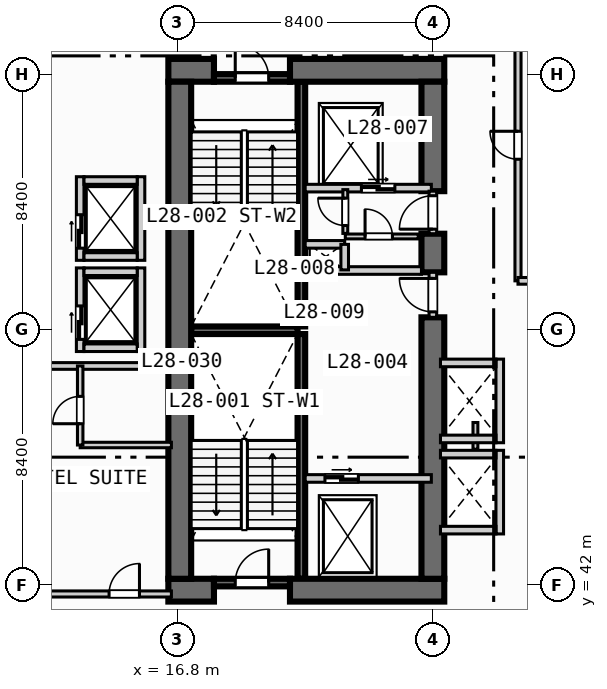
"""IFC4 building model, lengths in metres.
Left out: names, types, materials, properties, quantities, classifications, styles, units other than length and angle.
Written with IfcOpenShell. Run it as: python <this file> out.ifc"""

import sys

from ifc_helpers import new_model, si_unit, direction, frame, frame_2d, origin, place, context, subcontext, project, spatial, rectangle, extrude, element, fill, save


model = new_model("IFC4")
c1 = context("Model", 3, precision=1e-05, world=origin(), true_north=direction((0.0, 1.0)))
c2 = subcontext(c1, "Body", "Model", "MODEL_VIEW")
j1 = project(units=[si_unit("LENGTHUNIT", "METRE"), si_unit("PLANEANGLEUNIT", "RADIAN")], contexts=[c1])
p1 = place(None, origin())
s1 = spatial("IfcSite", under=j1, at=p1, CompositionType="ELEMENT")
p2 = place(p1, origin())
s2 = spatial("IfcBuilding", under=s1, at=p2, CompositionType="ELEMENT")
p3 = place(p2, frame((0.0, 0.0, 119.0)))
s3 = spatial("IfcBuildingStorey", under=s2, at=p3, CompositionType="ELEMENT", Elevation=119.0)
for number, where, z_axis, x_axis in (
    (1, (20.875, 42.2, 0.0), (0.0, 0.0, 1.0), (0.0, 1.0, 0.0)),
    (2, (20.875, 50.5, 0.0), (0.0, 0.0, 1.0), (0.0, 1.0, 0.0)),
):
    element("IfcWall", number, at=place(p3, frame(where, z_axis=z_axis, x_axis=x_axis)), inside=s3, PredefinedType="SOLIDWALL", context=c2, shape_type="SweptSolid", body=[
        extrude(rectangle(XDim=8.05, YDim=0.25, at=frame_2d((4.025, 0.0))), origin(), (0.0, 0.0, 1.0), 3.55),
    ])
p4 = place(p3, frame((17.25, 50.375, 0.0), z_axis=(0.0, 0.0, 1.0), x_axis=(1.0, 0.0, 0.0)))
e3 = element("IfcWall", 3, at=p4, inside=s3, PredefinedType="SOLIDWALL", context=c2, shape_type="SweptSolid", body=[
    extrude(rectangle(XDim=3.5, YDim=0.25, at=frame_2d((1.75, 0.0))), origin(), (0.0, 0.0, 1.0), 3.55),
])
p5 = place(p3, frame((16.5, 41.825, 0.0), z_axis=(0.0, 0.0, 1.0), x_axis=(1.0, 0.0, 0.0)))
e4 = element("IfcWall", 4, at=p5, inside=s3, PredefinedType="SHEAR", context=c2, shape_type="SweptSolid", body=[
    extrude(rectangle(XDim=1.5, YDim=0.75, at=frame_2d((0.75, 0.0))), origin(), (0.0, 0.0, 1.0), 3.55),
])
p6 = place(p3, frame((20.5, 41.825, 0.0), z_axis=(0.0, 0.0, 1.0), x_axis=(1.0, 0.0, 0.0)))
e5 = element("IfcWall", 5, at=p6, inside=s3, PredefinedType="SHEAR", context=c2, shape_type="SweptSolid", body=[
    extrude(rectangle(XDim=5.075, YDim=0.75, at=frame_2d((2.538, 0.0))), origin(), (0.0, 0.0, 1.0), 3.55),
])
p7 = place(p3, frame((16.5, 58.925, 0.0), z_axis=(0.0, 0.0, 1.0), x_axis=(1.0, 0.0, 0.0)))
e6 = element("IfcWall", 6, at=p7, inside=s3, PredefinedType="SHEAR", context=c2, shape_type="SweptSolid", body=[
    extrude(rectangle(XDim=1.5, YDim=0.75, at=frame_2d((0.75, 0.0))), origin(), (0.0, 0.0, 1.0), 3.55),
])
p8 = place(p3, frame((20.5, 58.925, 0.0), z_axis=(0.0, 0.0, 1.0), x_axis=(1.0, 0.0, 0.0)))
e7 = element("IfcWall", 7, at=p8, inside=s3, PredefinedType="SHEAR", context=c2, shape_type="SweptSolid", body=[
    extrude(rectangle(XDim=5.075, YDim=0.75, at=frame_2d((2.538, 0.0))), origin(), (0.0, 0.0, 1.0), 3.55),
])
p9 = place(p3, frame((16.875, 42.2, 0.0), z_axis=(0.0, 0.0, 1.0), x_axis=(0.0, 1.0, 0.0)))
e8 = element("IfcWall", 8, at=p9, inside=s3, PredefinedType="SHEAR", context=c2, shape_type="SweptSolid", body=[
    extrude(rectangle(XDim=16.35, YDim=0.75, at=frame_2d((8.175, 0.0))), origin(), (0.0, 0.0, 1.0), 3.55),
])
p10 = place(p3, frame((25.2, 42.2, 0.0), z_axis=(0.0, 0.0, 1.0), x_axis=(0.0, 1.0, 0.0)))
e9 = element("IfcWall", 9, at=p10, inside=s3, PredefinedType="SHEAR", context=c2, shape_type="SweptSolid", body=[
    extrude(rectangle(XDim=8.6, YDim=0.75, at=frame_2d((4.3, 0.0))), origin(), (0.0, 0.0, 1.0), 3.55),
])
p11 = place(p3, frame((25.2, 52.28, 0.0), z_axis=(0.0, 0.0, 1.0), x_axis=(0.0, 1.0, 0.0)))
e10 = element("IfcWall", 10, at=p11, inside=s3, PredefinedType="SHEAR", context=c2, shape_type="SweptSolid", body=[
    extrude(rectangle(XDim=1.27, YDim=0.75, at=frame_2d((0.635, 0.0))), origin(), (0.0, 0.0, 1.0), 3.55),
])
p12 = place(p3, frame((25.2, 54.95, 0.0), z_axis=(0.0, 0.0, 1.0), x_axis=(0.0, 1.0, 0.0)))
e11 = element("IfcWall", 11, at=p12, inside=s3, PredefinedType="SHEAR", context=c2, shape_type="SweptSolid", body=[
    extrude(rectangle(XDim=3.6, YDim=0.75, at=frame_2d((1.8, 0.0))), origin(), (0.0, 0.0, 1.0), 3.55),
])
p13 = place(p3, frame((18.0, 42.075, 0.0), z_axis=(0.0, 0.0, 1.0), x_axis=(1.0, 0.0, 0.0)))
e12 = element("IfcWall", 12, at=p13, inside=s3, PredefinedType="SOLIDWALL", context=c2, shape_type="SweptSolid", body=[
    extrude(rectangle(XDim=2.5, YDim=0.25, at=frame_2d((1.25, 0.0))), origin(), (0.0, 0.0, 1.0), 3.55),
])
p14 = place(p13, frame((0.7, 0.0, 0.0)))
e13 = element("IfcOpeningElement", 13, at=p14, cuts=e12, PredefinedType="OPENING", context=c2, shape_type="SweptSolid", body=[
    extrude(rectangle(XDim=1.1, YDim=2.15, at=frame_2d((0.55, 1.075))), frame((0.0, 0.135, 0.0), z_axis=(0.0, -1.0, 0.0), x_axis=(1.0, 0.0, 0.0)), (0.0, 0.0, 1.0), 0.27),
])
p15 = place(p3, frame((18.0, 58.675, 0.0), z_axis=(0.0, 0.0, 1.0), x_axis=(1.0, 0.0, 0.0)))
e14 = element("IfcWall", 14, at=p15, inside=s3, PredefinedType="SOLIDWALL", context=c2, shape_type="SweptSolid", body=[
    extrude(rectangle(XDim=2.5, YDim=0.25, at=frame_2d((1.25, 0.0))), origin(), (0.0, 0.0, 1.0), 3.55),
])
p16 = place(p15, frame((0.7, 0.0, 0.0)))
e15 = element("IfcOpeningElement", 15, at=p16, cuts=e14, PredefinedType="OPENING", context=c2, shape_type="SweptSolid", body=[
    extrude(rectangle(XDim=1.1, YDim=2.15, at=frame_2d((0.55, 1.075))), frame((0.0, 0.135, 0.0), z_axis=(0.0, -1.0, 0.0), x_axis=(1.0, 0.0, 0.0)), (0.0, 0.0, 1.0), 0.27),
])
p17 = place(p3, frame((21.0, 45.5, 0.0), z_axis=(0.0, 0.0, 1.0), x_axis=(1.0, 0.0, 0.0)))
e16 = element("IfcWall", 16, at=p17, inside=s3, PredefinedType="SOLIDWALL", context=c2, shape_type="SweptSolid", body=[
    extrude(rectangle(XDim=4.15, YDim=0.25, at=frame_2d((2.075, 0.0))), origin(), (0.0, 0.0, 1.0), 3.55),
])
p18 = place(p17, frame((0.65, 0.0, 0.0)))
e17 = element("IfcOpeningElement", 17, at=p18, cuts=e16, PredefinedType="OPENING", context=c2, shape_type="SweptSolid", body=[
    extrude(rectangle(XDim=1.1, YDim=2.15, at=frame_2d((0.55, 1.075))), frame((0.0, 0.135, 0.0), z_axis=(0.0, -1.0, 0.0), x_axis=(1.0, 0.0, 0.0)), (0.0, 0.0, 1.0), 0.27),
])
p19 = place(p3, frame((25.2, 50.8, 0.0), z_axis=(0.0, 0.0, 1.0), x_axis=(0.0, 1.0, 0.0)))
e18 = element("IfcWall", 18, at=p19, inside=s3, PredefinedType="SOLIDWALL", context=c2, shape_type="SweptSolid", body=[
    extrude(rectangle(XDim=1.48, YDim=0.25, at=frame_2d((0.74, 0.0))), origin(), (0.0, 0.0, 1.0), 3.55),
])
p20 = place(p19, frame((0.18, 0.0, 0.0)))
e19 = element("IfcOpeningElement", 19, at=p20, cuts=e18, PredefinedType="OPENING", context=c2, shape_type="SweptSolid", body=[
    extrude(rectangle(XDim=1.1, YDim=2.15, at=frame_2d((0.55, 1.075))), frame((0.0, 0.135, 0.0), z_axis=(0.0, -1.0, 0.0), x_axis=(1.0, 0.0, 0.0)), (0.0, 0.0, 1.0), 0.27),
])
p21 = place(p3, frame((21.0, 52.34, 0.0), z_axis=(0.0, 0.0, 1.0), x_axis=(1.0, 0.0, 0.0)))
e20 = element("IfcWall", 20, at=p21, inside=s3, PredefinedType="SOLIDWALL", context=c2, shape_type="SweptSolid", body=[
    extrude(rectangle(XDim=3.825, YDim=0.25, at=frame_2d((1.913, 0.0))), origin(), (0.0, 0.0, 1.0), 3.55),
])
p22 = place(p3, frame((21.0, 55.05, 0.0), z_axis=(0.0, 0.0, 1.0), x_axis=(1.0, 0.0, 0.0)))
e21 = element("IfcWall", 21, at=p22, inside=s3, PredefinedType="SOLIDWALL", context=c2, shape_type="SweptSolid", body=[
    extrude(rectangle(XDim=4.15, YDim=0.25, at=frame_2d((2.075, 0.0))), origin(), (0.0, 0.0, 1.0), 3.55),
])
p23 = place(p22, frame((1.85, 0.0, 0.0)))
e22 = element("IfcOpeningElement", 22, at=p23, cuts=e21, PredefinedType="OPENING", context=c2, shape_type="SweptSolid", body=[
    extrude(rectangle(XDim=1.1, YDim=2.15, at=frame_2d((0.55, 1.075))), frame((0.0, 0.135, 0.0), z_axis=(0.0, -1.0, 0.0), x_axis=(1.0, 0.0, 0.0)), (0.0, 0.0, 1.0), 0.27),
])
p24 = place(p3, frame((25.2, 53.55, 0.0), z_axis=(0.0, 0.0, 1.0), x_axis=(0.0, 1.0, 0.0)))
e23 = element("IfcWall", 23, at=p24, inside=s3, PredefinedType="SOLIDWALL", context=c2, shape_type="SweptSolid", body=[
    extrude(rectangle(XDim=1.4, YDim=0.25, at=frame_2d((0.7, 0.0))), origin(), (0.0, 0.0, 1.0), 3.55),
])
p25 = place(p24, frame((0.15, 0.0, 0.0)))
e24 = element("IfcOpeningElement", 24, at=p25, cuts=e23, PredefinedType="OPENING", context=c2, shape_type="SweptSolid", body=[
    extrude(rectangle(XDim=1.1, YDim=2.15, at=frame_2d((0.55, 1.075))), frame((0.0, 0.135, 0.0), z_axis=(0.0, -1.0, 0.0), x_axis=(1.0, 0.0, 0.0)), (0.0, 0.0, 1.0), 0.27),
])
p26 = place(p3, frame((21.0, 53.2, 0.0), z_axis=(0.0, 0.0, 1.0), x_axis=(1.0, 0.0, 0.0)))
e25 = element("IfcWall", 25, at=p26, inside=s3, PredefinedType="SOLIDWALL", context=c2, shape_type="SweptSolid", body=[
    extrude(rectangle(XDim=1.3, YDim=0.25, at=frame_2d((0.65, 0.0))), origin(), (0.0, 0.0, 1.0), 3.55),
])
p27 = place(p3, frame((22.3, 52.36, 0.0), z_axis=(0.0, 0.0, 1.0), x_axis=(0.0, 1.0, 0.0)))
e26 = element("IfcWall", 26, at=p27, inside=s3, PredefinedType="SOLIDWALL", context=c2, shape_type="SweptSolid", body=[
    extrude(rectangle(XDim=0.84, YDim=0.25, at=frame_2d((0.42, 0.0))), origin(), (0.0, 0.0, 1.0), 3.55),
])
p28 = place(p3, frame((22.32, 53.56, 0.0), z_axis=(0.0, 0.0, 1.0), x_axis=(0.0, 1.0, 0.0)))
e27 = element("IfcWall", 27, at=p28, inside=s3, PredefinedType="PARTITIONING", context=c2, shape_type="SweptSolid", body=[
    extrude(rectangle(XDim=1.44, YDim=0.16, at=frame_2d((0.72, 0.0))), origin(), (0.0, 0.0, 1.0), 3.55),
])
p29 = place(p28, frame((0.26, 0.0, 0.0)))
e28 = element("IfcOpeningElement", 28, at=p29, cuts=e27, PredefinedType="OPENING", context=c2, shape_type="SweptSolid", body=[
    extrude(rectangle(XDim=0.9, YDim=2.1, at=frame_2d((0.45, 1.05))), frame((0.0, 0.09, 0.0), z_axis=(0.0, -1.0, 0.0), x_axis=(1.0, 0.0, 0.0)), (0.0, 0.0, 1.0), 0.18),
])
p30 = place(p3, frame((22.32, 53.46, 0.0), z_axis=(0.0, 0.0, 1.0), x_axis=(1.0, 0.0, 0.0)))
e29 = element("IfcWall", 29, at=p30, inside=s3, PredefinedType="PARTITIONING", context=c2, shape_type="SweptSolid", body=[
    extrude(rectangle(XDim=2.4, YDim=0.16, at=frame_2d((1.2, 0.0))), origin(), (0.0, 0.0, 1.0), 3.55),
])
p31 = place(p30, frame((0.65, 0.0, 0.0)))
e30 = element("IfcOpeningElement", 30, at=p31, cuts=e29, PredefinedType="OPENING", context=c2, shape_type="SweptSolid", body=[
    extrude(rectangle(XDim=0.9, YDim=2.1, at=frame_2d((0.45, 1.05))), frame((0.0, 0.09, 0.0), z_axis=(0.0, -1.0, 0.0), x_axis=(1.0, 0.0, 0.0)), (0.0, 0.0, 1.0), 0.18),
])
p32 = place(p3, frame((13.6, 49.675, 0.0), z_axis=(0.0, 0.0, 1.0), x_axis=(0.0, 1.0, 0.0)))
e31 = element("IfcWall", 31, at=p32, inside=s3, PredefinedType="SOLIDWALL", context=c2, shape_type="SweptSolid", body=[
    extrude(rectangle(XDim=2.75, YDim=0.25, at=frame_2d((1.375, 0.0))), origin(), (0.0, 0.0, 1.0), 3.55),
])
p33 = place(p32, frame((0.4, 0.0, 0.0)))
e32 = element("IfcOpeningElement", 32, at=p33, cuts=e31, PredefinedType="OPENING", context=c2, shape_type="SweptSolid", body=[
    extrude(rectangle(XDim=1.1, YDim=2.15, at=frame_2d((0.55, 1.075))), frame((0.0, 0.135, 0.0), z_axis=(0.0, -1.0, 0.0), x_axis=(1.0, 0.0, 0.0)), (0.0, 0.0, 1.0), 0.27),
])
p34 = place(p3, frame((15.6, 49.675, 0.0), z_axis=(0.0, 0.0, 1.0), x_axis=(0.0, 1.0, 0.0)))
e33 = element("IfcWall", 33, at=p34, inside=s3, PredefinedType="SOLIDWALL", context=c2, shape_type="SweptSolid", body=[
    extrude(rectangle(XDim=2.75, YDim=0.25, at=frame_2d((1.375, 0.0))), origin(), (0.0, 0.0, 1.0), 3.55),
])
for number, where, z_axis, x_axis in (
    (34, (13.725, 49.8, 0.0), (0.0, 0.0, 1.0), (1.0, 0.0, 0.0)),
    (35, (13.725, 52.3, 0.0), (0.0, 0.0, 1.0), (1.0, 0.0, 0.0)),
):
    element("IfcWall", number, at=place(p3, frame(where, z_axis=z_axis, x_axis=x_axis)), inside=s3, PredefinedType="SOLIDWALL", context=c2, shape_type="SweptSolid", body=[
        extrude(rectangle(XDim=1.75, YDim=0.25, at=frame_2d((0.875, 0.0))), origin(), (0.0, 0.0, 1.0), 3.55),
    ])
p35 = place(p3, frame((13.6, 52.675, 0.0), z_axis=(0.0, 0.0, 1.0), x_axis=(0.0, 1.0, 0.0)))
e36 = element("IfcWall", 36, at=p35, inside=s3, PredefinedType="SOLIDWALL", context=c2, shape_type="SweptSolid", body=[
    extrude(rectangle(XDim=2.75, YDim=0.25, at=frame_2d((1.375, 0.0))), origin(), (0.0, 0.0, 1.0), 3.55),
])
p36 = place(p35, frame((0.4, 0.0, 0.0)))
e37 = element("IfcOpeningElement", 37, at=p36, cuts=e36, PredefinedType="OPENING", context=c2, shape_type="SweptSolid", body=[
    extrude(rectangle(XDim=1.1, YDim=2.15, at=frame_2d((0.55, 1.075))), frame((0.0, 0.135, 0.0), z_axis=(0.0, -1.0, 0.0), x_axis=(1.0, 0.0, 0.0)), (0.0, 0.0, 1.0), 0.27),
])
p37 = place(p3, frame((15.6, 52.675, 0.0), z_axis=(0.0, 0.0, 1.0), x_axis=(0.0, 1.0, 0.0)))
e38 = element("IfcWall", 38, at=p37, inside=s3, PredefinedType="SOLIDWALL", context=c2, shape_type="SweptSolid", body=[
    extrude(rectangle(XDim=2.75, YDim=0.25, at=frame_2d((1.375, 0.0))), origin(), (0.0, 0.0, 1.0), 3.55),
])
for number, where, z_axis, x_axis in (
    (39, (13.725, 52.8, 0.0), (0.0, 0.0, 1.0), (1.0, 0.0, 0.0)),
    (40, (13.725, 55.3, 0.0), (0.0, 0.0, 1.0), (1.0, 0.0, 0.0)),
):
    element("IfcWall", number, at=place(p3, frame(where, z_axis=z_axis, x_axis=x_axis)), inside=s3, PredefinedType="SOLIDWALL", context=c2, shape_type="SweptSolid", body=[
        extrude(rectangle(XDim=1.75, YDim=0.25, at=frame_2d((0.875, 0.0))), origin(), (0.0, 0.0, 1.0), 3.55),
    ])
p38 = place(p3, frame((27.4, 43.675, 0.0), z_axis=(0.0, 0.0, 1.0), x_axis=(0.0, 1.0, 0.0)))
e41 = element("IfcWall", 41, at=p38, inside=s3, PredefinedType="SOLIDWALL", context=c2, shape_type="SweptSolid", body=[
    extrude(rectangle(XDim=2.75, YDim=0.25, at=frame_2d((1.375, 0.0))), origin(), (0.0, 0.0, 1.0), 3.55),
])
for number, where, z_axis, x_axis in (
    (42, (25.45, 43.8, 0.0), (0.0, 0.0, 1.0), (1.0, 0.0, 0.0)),
    (43, (25.45, 46.3, 0.0), (0.0, 0.0, 1.0), (1.0, 0.0, 0.0)),
):
    element("IfcWall", number, at=place(p3, frame(where, z_axis=z_axis, x_axis=x_axis)), inside=s3, PredefinedType="SOLIDWALL", context=c2, shape_type="SweptSolid", body=[
        extrude(rectangle(XDim=1.825, YDim=0.25, at=frame_2d((0.913, 0.0))), origin(), (0.0, 0.0, 1.0), 3.55),
    ])
p39 = place(p3, frame((26.6, 46.46, 0.0), z_axis=(0.0, 0.0, 1.0), x_axis=(0.0, 1.0, 0.0)))
e44 = element("IfcWall", 44, at=p39, inside=s3, PredefinedType="PARTITIONING", context=c2, shape_type="SweptSolid", body=[
    extrude(rectangle(XDim=0.88, YDim=0.16, at=frame_2d((0.44, 0.0))), origin(), (0.0, 0.0, 1.0), 3.55),
])
p40 = place(p3, frame((27.4, 46.675, 0.0), z_axis=(0.0, 0.0, 1.0), x_axis=(0.0, 1.0, 0.0)))
e45 = element("IfcWall", 45, at=p40, inside=s3, PredefinedType="SOLIDWALL", context=c2, shape_type="SweptSolid", body=[
    extrude(rectangle(XDim=2.75, YDim=0.25, at=frame_2d((1.375, 0.0))), origin(), (0.0, 0.0, 1.0), 3.55),
])
for number, where, z_axis, x_axis in (
    (46, (25.45, 46.8, 0.0), (0.0, 0.0, 1.0), (1.0, 0.0, 0.0)),
    (47, (25.45, 49.3, 0.0), (0.0, 0.0, 1.0), (1.0, 0.0, 0.0)),
):
    element("IfcWall", number, at=place(p3, frame(where, z_axis=z_axis, x_axis=x_axis)), inside=s3, PredefinedType="SOLIDWALL", context=c2, shape_type="SweptSolid", body=[
        extrude(rectangle(XDim=1.825, YDim=0.25, at=frame_2d((0.913, 0.0))), origin(), (0.0, 0.0, 1.0), 3.55),
    ])
p41 = place(p3, frame((0.35, 41.7, 0.0), z_axis=(0.0, 0.0, 1.0), x_axis=(1.0, 0.0, 0.0)))
e48 = element("IfcWall", 48, at=p41, inside=s3, PredefinedType="PARTITIONING", context=c2, shape_type="SweptSolid", body=[
    extrude(rectangle(XDim=16.25, YDim=0.2, at=frame_2d((8.125, 0.0))), origin(), (0.0, 0.0, 1.0), 2.8),
])
p42 = place(p41, frame((14.2, 0.0, 0.0)))
e49 = element("IfcOpeningElement", 49, at=p42, cuts=e48, PredefinedType="OPENING", context=c2, shape_type="SweptSolid", body=[
    extrude(rectangle(XDim=1.0, YDim=2.15, at=frame_2d((0.5, 1.075))), frame((0.0, 0.11, 0.0), z_axis=(0.0, -1.0, 0.0), x_axis=(1.0, 0.0, 0.0)), (0.0, 0.0, 1.0), 0.22),
])
p43 = place(p3, frame((0.35, 49.2, 0.0), z_axis=(0.0, 0.0, 1.0), x_axis=(1.0, 0.0, 0.0)))
e50 = element("IfcWall", 50, at=p43, inside=s3, PredefinedType="PARTITIONING", context=c2, shape_type="SweptSolid", body=[
    extrude(rectangle(XDim=16.25, YDim=0.22, at=frame_2d((8.125, 0.0))), origin(), (0.0, 0.0, 1.0), 3.55),
])
p44 = place(p3, frame((13.6, 46.6, 0.0), z_axis=(0.0, 0.0, 1.0), x_axis=(1.0, 0.0, 0.0)))
e51 = element("IfcWall", 51, at=p44, inside=s3, PredefinedType="PLUMBINGWALL", context=c2, shape_type="SweptSolid", body=[
    extrude(rectangle(XDim=3.0, YDim=0.18, at=frame_2d((1.5, 0.0))), origin(), (0.0, 0.0, 1.0), 3.55),
])
p45 = place(p3, frame((13.6, 46.6, 0.0), z_axis=(0.0, 0.0, 1.0), x_axis=(0.0, 1.0, 0.0)))
e52 = element("IfcWall", 52, at=p45, inside=s3, PredefinedType="PLUMBINGWALL", context=c2, shape_type="SweptSolid", body=[
    extrude(rectangle(XDim=2.6, YDim=0.18, at=frame_2d((1.3, 0.0))), origin(), (0.0, 0.0, 1.0), 3.55),
])
p46 = place(p45, frame((0.7, 0.0, 0.0)))
e53 = element("IfcOpeningElement", 53, at=p46, cuts=e52, PredefinedType="OPENING", context=c2, shape_type="SweptSolid", body=[
    extrude(rectangle(XDim=0.9, YDim=2.1, at=frame_2d((0.45, 1.05))), frame((0.0, 0.1, 0.0), z_axis=(0.0, -1.0, 0.0), x_axis=(1.0, 0.0, 0.0)), (0.0, 0.0, 1.0), 0.2),
])
p47 = place(p3, frame((28.0, 52.0, 0.0), z_axis=(0.0, 0.0, 1.0), x_axis=(0.0, 1.0, 0.0)))
e54 = element("IfcWall", 54, at=p47, inside=s3, PredefinedType="PARTITIONING", context=c2, shape_type="SweptSolid", body=[
    extrude(rectangle(XDim=37.0, YDim=0.2, at=frame_2d((18.5, 0.0))), origin(), (0.0, 0.0, 1.0), 3.55),
])
p48 = place(p47, frame((4.0, 0.0, 0.0)))
e55 = element("IfcOpeningElement", 55, at=p48, cuts=e54, PredefinedType="OPENING", context=c2, shape_type="SweptSolid", body=[
    extrude(rectangle(XDim=0.92, YDim=2.1, at=frame_2d((0.46, 1.05))), frame((0.0, 0.11, 0.0), z_axis=(0.0, -1.0, 0.0), x_axis=(1.0, 0.0, 0.0)), (0.0, 0.0, 1.0), 0.22),
])
p49 = place(p3, frame((28.0, 52.0, 0.0), z_axis=(0.0, 0.0, 1.0), x_axis=(1.0, 0.0, 0.0)))
e56 = element("IfcWall", 56, at=p49, inside=s3, PredefinedType="PARTITIONING", context=c2, shape_type="SweptSolid", body=[
    extrude(rectangle(XDim=5.3, YDim=0.22, at=frame_2d((2.65, 0.0))), origin(), (0.0, 0.0, 1.0), 3.55),
])
p50 = place(p14, origin())
e57 = element("IfcDoor", 57, at=p50, inside=s3, OperationType="SINGLE_SWING_RIGHT", PredefinedType="DOOR", context=c2, shape_type="SweptSolid", body=[
    extrude(rectangle(XDim=1.1, YDim=2.15, at=frame_2d((0.55, 1.075))), frame((0.0, 0.025, 0.0), z_axis=(0.0, -1.0, 0.0), x_axis=(1.0, 0.0, 0.0)), (0.0, 0.0, 1.0), 0.05),
])
fill(e13, e57)
p51 = place(p16, origin())
e58 = element("IfcDoor", 58, at=p51, inside=s3, OperationType="SINGLE_SWING_LEFT", PredefinedType="DOOR", context=c2, shape_type="SweptSolid", body=[
    extrude(rectangle(XDim=1.1, YDim=2.15, at=frame_2d((0.55, 1.075))), frame((0.0, 0.025, 0.0), z_axis=(0.0, -1.0, 0.0), x_axis=(1.0, 0.0, 0.0)), (0.0, 0.0, 1.0), 0.05),
])
fill(e15, e58)
p52 = place(p18, origin())
e59 = element("IfcDoor", 59, at=p52, inside=s3, OperationType="SLIDING_TO_LEFT", PredefinedType="DOOR", context=c2, shape_type="SweptSolid", body=[
    extrude(rectangle(XDim=1.1, YDim=2.15, at=frame_2d((0.55, 1.075))), frame((0.0, 0.025, 0.0), z_axis=(0.0, -1.0, 0.0), x_axis=(1.0, 0.0, 0.0)), (0.0, 0.0, 1.0), 0.05),
])
fill(e17, e59)
p53 = place(p20, origin())
e60 = element("IfcDoor", 60, at=p53, inside=s3, OperationType="SINGLE_SWING_RIGHT", PredefinedType="DOOR", context=c2, shape_type="SweptSolid", body=[
    extrude(rectangle(XDim=1.1, YDim=2.15, at=frame_2d((0.55, 1.075))), frame((0.0, 0.025, 0.0), z_axis=(0.0, -1.0, 0.0), x_axis=(1.0, 0.0, 0.0)), (0.0, 0.0, 1.0), 0.05),
])
fill(e19, e60)
p54 = place(p23, origin())
e61 = element("IfcDoor", 61, at=p54, inside=s3, OperationType="SLIDING_TO_LEFT", PredefinedType="DOOR", context=c2, shape_type="SweptSolid", body=[
    extrude(rectangle(XDim=1.1, YDim=2.15, at=frame_2d((0.55, 1.075))), frame((0.0, 0.025, 0.0), z_axis=(0.0, -1.0, 0.0), x_axis=(1.0, 0.0, 0.0)), (0.0, 0.0, 1.0), 0.05),
])
fill(e22, e61)
p55 = place(p25, origin())
e62 = element("IfcDoor", 62, at=p55, inside=s3, OperationType="SINGLE_SWING_LEFT", PredefinedType="DOOR", context=c2, shape_type="SweptSolid", body=[
    extrude(rectangle(XDim=1.1, YDim=2.15, at=frame_2d((0.55, 1.075))), frame((0.0, 0.025, 0.0), z_axis=(0.0, -1.0, 0.0), x_axis=(1.0, 0.0, 0.0)), (0.0, 0.0, 1.0), 0.05),
])
fill(e24, e62)
p56 = place(p29, origin())
e63 = element("IfcDoor", 63, at=p56, inside=s3, OperationType="SINGLE_SWING_RIGHT", PredefinedType="DOOR", context=c2, shape_type="SweptSolid", body=[
    extrude(rectangle(XDim=0.9, YDim=2.1, at=frame_2d((0.45, 1.05))), frame((0.0, 0.025, 0.0), z_axis=(0.0, -1.0, 0.0), x_axis=(1.0, 0.0, 0.0)), (0.0, 0.0, 1.0), 0.05),
])
fill(e28, e63)
p57 = place(p31, origin())
e64 = element("IfcDoor", 64, at=p57, inside=s3, OperationType="SINGLE_SWING_LEFT", PredefinedType="DOOR", context=c2, shape_type="SweptSolid", body=[
    extrude(rectangle(XDim=0.9, YDim=2.1, at=frame_2d((0.45, 1.05))), frame((0.0, 0.025, 0.0), z_axis=(0.0, -1.0, 0.0), x_axis=(1.0, 0.0, 0.0)), (0.0, 0.0, 1.0), 0.05),
])
fill(e30, e64)
p58 = place(p33, origin())
e65 = element("IfcDoor", 65, at=p58, inside=s3, OperationType="SLIDING_TO_LEFT", PredefinedType="DOOR", context=c2, shape_type="SweptSolid", body=[
    extrude(rectangle(XDim=1.1, YDim=2.15, at=frame_2d((0.55, 1.075))), frame((0.0, 0.025, 0.0), z_axis=(0.0, -1.0, 0.0), x_axis=(1.0, 0.0, 0.0)), (0.0, 0.0, 1.0), 0.05),
])
fill(e32, e65)
p59 = place(p36, origin())
e66 = element("IfcDoor", 66, at=p59, inside=s3, OperationType="SLIDING_TO_LEFT", PredefinedType="DOOR", context=c2, shape_type="SweptSolid", body=[
    extrude(rectangle(XDim=1.1, YDim=2.15, at=frame_2d((0.55, 1.075))), frame((0.0, 0.025, 0.0), z_axis=(0.0, -1.0, 0.0), x_axis=(1.0, 0.0, 0.0)), (0.0, 0.0, 1.0), 0.05),
])
fill(e37, e66)
p60 = place(p42, origin())
e67 = element("IfcDoor", 67, at=p60, inside=s3, OperationType="SINGLE_SWING_RIGHT", PredefinedType="DOOR", context=c2, shape_type="SweptSolid", body=[
    extrude(rectangle(XDim=1.0, YDim=2.15, at=frame_2d((0.5, 1.075))), frame((0.0, 0.025, 0.0), z_axis=(0.0, -1.0, 0.0), x_axis=(1.0, 0.0, 0.0)), (0.0, 0.0, 1.0), 0.05),
])
fill(e49, e67)
p61 = place(p46, origin())
e68 = element("IfcDoor", 68, at=p61, inside=s3, OperationType="SINGLE_SWING_LEFT", PredefinedType="DOOR", context=c2, shape_type="SweptSolid", body=[
    extrude(rectangle(XDim=0.9, YDim=2.1, at=frame_2d((0.45, 1.05))), frame((0.0, 0.025, 0.0), z_axis=(0.0, -1.0, 0.0), x_axis=(1.0, 0.0, 0.0)), (0.0, 0.0, 1.0), 0.05),
])
fill(e53, e68)
p62 = place(p48, origin())
e69 = element("IfcDoor", 69, at=p62, inside=s3, OperationType="SINGLE_SWING_RIGHT", PredefinedType="DOOR", context=c2, shape_type="SweptSolid", body=[
    extrude(rectangle(XDim=0.92, YDim=2.1, at=frame_2d((0.46, 1.05))), frame((0.0, 0.025, 0.0), z_axis=(0.0, -1.0, 0.0), x_axis=(1.0, 0.0, 0.0)), (0.0, 0.0, 1.0), 0.05),
])
fill(e55, e69)
save(model, sys.argv[1])
